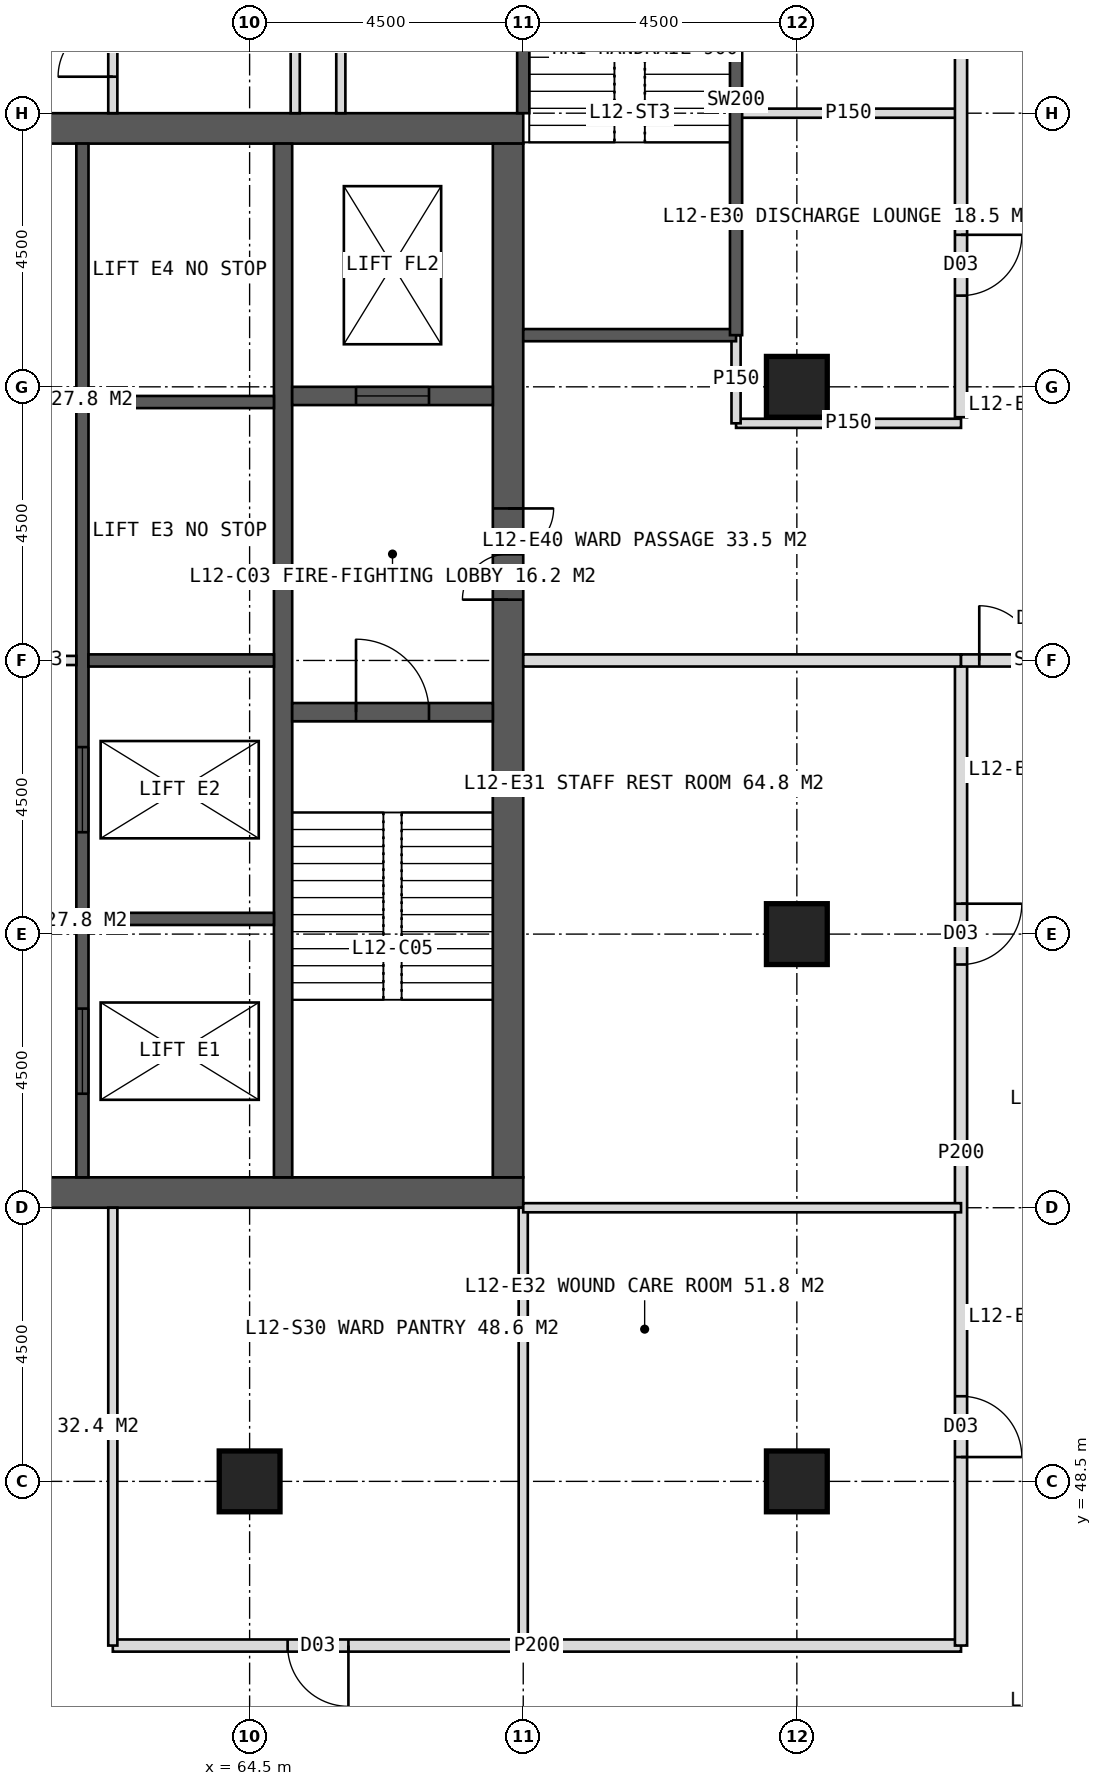
"""IFC4 building model, lengths in metres.
Left out: names, types, materials, properties, quantities, classifications, styles, units other than length and angle.
Written with IfcOpenShell. Run it as: python <this file> out.ifc"""

import sys

from ifc_helpers import new_model, si_unit, direction, frame, frame_2d, origin, origin_2d, place, context, subcontext, project, spatial, rectangle, hollow_rectangle, extrude, element, fill, save


model = new_model("IFC4")
c1 = context("Model", 3, precision=1e-05, world=origin(), true_north=direction((0.0, 1.0)))
c2 = subcontext(c1, "Body", "Model", "MODEL_VIEW")
j1 = project(units=[si_unit("LENGTHUNIT", "METRE"), si_unit("PLANEANGLEUNIT", "RADIAN")], contexts=[c1])
p1 = place(None, origin())
s1 = spatial("IfcSite", under=j1, at=p1, CompositionType="ELEMENT")
p2 = place(p1, origin())
s2 = spatial("IfcBuilding", under=s1, at=p2, CompositionType="ELEMENT")
p3 = place(p2, frame((0.0, 0.0, 55.0)))
s3 = spatial("IfcBuildingStorey", under=s2, at=p3, CompositionType="ELEMENT", Elevation=55.0)
p4 = place(p3, frame((51.0, 70.75, 0.0), z_axis=(0.0, 0.0, 1.0), x_axis=(1.0, 0.0, 0.0)))
e1 = element("IfcWall", 1, at=p4, inside=s3, PredefinedType="SHEAR", context=c2, shape_type="SweptSolid", body=[
    extrude(rectangle(XDim=18.0, YDim=0.5, at=frame_2d((9.0, 0.0))), origin(), (0.0, 0.0, 1.0), 4.0),
])
p5 = place(p4, frame((8.1, 0.0, 0.0)))
e2 = element("IfcOpeningElement", 2, at=p5, cuts=e1, PredefinedType="OPENING", context=c2, shape_type="SweptSolid", body=[
    extrude(rectangle(XDim=1.8, YDim=2.2, at=frame_2d((0.9, 1.1))), frame((0.0, 0.26, 0.0), z_axis=(0.0, -1.0, 0.0), x_axis=(1.0, 0.0, 0.0)), (0.0, 0.0, 1.0), 0.52),
])
p6 = place(p3, frame((51.0, 53.25, 0.0), z_axis=(0.0, 0.0, 1.0), x_axis=(1.0, 0.0, 0.0)))
e3 = element("IfcWall", 3, at=p6, inside=s3, PredefinedType="SHEAR", context=c2, shape_type="SweptSolid", body=[
    extrude(rectangle(XDim=18.0, YDim=0.5, at=frame_2d((9.0, 0.0))), origin(), (0.0, 0.0, 1.0), 4.0),
])
p7 = place(p6, frame((8.1, 0.0, 0.0)))
e4 = element("IfcOpeningElement", 4, at=p7, cuts=e3, PredefinedType="OPENING", context=c2, shape_type="SweptSolid", body=[
    extrude(rectangle(XDim=1.8, YDim=2.2, at=frame_2d((0.9, 1.1))), frame((0.0, 0.26, 0.0), z_axis=(0.0, -1.0, 0.0), x_axis=(1.0, 0.0, 0.0)), (0.0, 0.0, 1.0), 0.52),
])
p8 = place(p3, frame((68.75, 53.5, 0.0), z_axis=(0.0, 0.0, 1.0), x_axis=(0.0, 1.0, 0.0)))
e5 = element("IfcWall", 5, at=p8, inside=s3, PredefinedType="SHEAR", context=c2, shape_type="SweptSolid", body=[
    extrude(rectangle(XDim=17.0, YDim=0.5, at=frame_2d((8.5, 0.0))), origin(), (0.0, 0.0, 1.0), 4.0),
])
p9 = place(p8, frame((9.5, 0.0, 0.0)))
e6 = element("IfcOpeningElement", 6, at=p9, cuts=e5, PredefinedType="OPENING", context=c2, shape_type="SweptSolid", body=[
    extrude(rectangle(XDim=1.5, YDim=2.2, at=frame_2d((0.75, 1.1))), frame((0.0, 0.26, 0.0), z_axis=(0.0, -1.0, 0.0), x_axis=(1.0, 0.0, 0.0)), (0.0, 0.0, 1.0), 0.52),
])
p10 = place(p3, frame((65.05, 53.5, 0.0), z_axis=(0.0, 0.0, 1.0), x_axis=(0.0, 1.0, 0.0)))
e7 = element("IfcWall", 7, at=p10, inside=s3, PredefinedType="SHEAR", context=c2, shape_type="SweptSolid", body=[
    extrude(rectangle(XDim=17.0, YDim=0.3, at=frame_2d((8.5, 0.0))), origin(), (0.0, 0.0, 1.0), 4.0),
])
p11 = place(p3, frame((61.75, 53.5, 0.0), z_axis=(0.0, 0.0, 1.0), x_axis=(0.0, 1.0, 0.0)))
e8 = element("IfcWall", 8, at=p11, inside=s3, PredefinedType="SHEAR", context=c2, shape_type="SweptSolid", body=[
    extrude(rectangle(XDim=17.0, YDim=0.2, at=frame_2d((8.5, 0.0))), origin(), (0.0, 0.0, 1.0), 4.0),
])
p12 = place(p11, frame((1.375, 0.0, 0.0)))
e9 = element("IfcOpeningElement", 9, at=p12, cuts=e8, PredefinedType="OPENING", context=c2, shape_type="SweptSolid", body=[
    extrude(rectangle(XDim=1.4, YDim=2.2, at=frame_2d((0.7, 1.1))), frame((0.0, 0.11, 0.0), z_axis=(0.0, -1.0, 0.0), x_axis=(1.0, 0.0, 0.0)), (0.0, 0.0, 1.0), 0.22),
])
p13 = place(p11, frame((5.675, 0.0, 0.0)))
e10 = element("IfcOpeningElement", 10, at=p13, cuts=e8, PredefinedType="OPENING", context=c2, shape_type="SweptSolid", body=[
    extrude(rectangle(XDim=1.4, YDim=2.2, at=frame_2d((0.7, 1.1))), frame((0.0, 0.11, 0.0), z_axis=(0.0, -1.0, 0.0), x_axis=(1.0, 0.0, 0.0)), (0.0, 0.0, 1.0), 0.22),
])
for number, where, z_axis, x_axis in (
    (11, (61.85, 57.75, 0.0), (0.0, 0.0, 1.0), (1.0, 0.0, 0.0)),
    (12, (61.85, 62.0, 0.0), (0.0, 0.0, 1.0), (1.0, 0.0, 0.0)),
    (13, (61.85, 66.25, 0.0), (0.0, 0.0, 1.0), (1.0, 0.0, 0.0)),
):
    element("IfcWall", number, at=place(p3, frame(where, z_axis=z_axis, x_axis=x_axis)), inside=s3, PredefinedType="SHEAR", context=c2, shape_type="SweptSolid", body=[
        extrude(rectangle(XDim=3.05, YDim=0.2, at=frame_2d((1.525, 0.0))), origin(), (0.0, 0.0, 1.0), 4.0),
    ])
p14 = place(p3, frame((65.2, 61.15, 0.0), z_axis=(0.0, 0.0, 1.0), x_axis=(1.0, 0.0, 0.0)))
e14 = element("IfcWall", 14, at=p14, inside=s3, PredefinedType="SHEAR", context=c2, shape_type="SweptSolid", body=[
    extrude(rectangle(XDim=3.3, YDim=0.3, at=frame_2d((1.65, 0.0))), origin(), (0.0, 0.0, 1.0), 4.0),
])
p15 = place(p14, frame((1.05, 0.0, 0.0)))
e15 = element("IfcOpeningElement", 15, at=p15, cuts=e14, PredefinedType="OPENING", context=c2, shape_type="SweptSolid", body=[
    extrude(rectangle(XDim=1.2, YDim=2.1, at=frame_2d((0.6, 1.05))), frame((0.0, 0.16, 0.0), z_axis=(0.0, -1.0, 0.0), x_axis=(1.0, 0.0, 0.0)), (0.0, 0.0, 1.0), 0.32),
])
p16 = place(p3, frame((65.2, 66.35, 0.0), z_axis=(0.0, 0.0, 1.0), x_axis=(1.0, 0.0, 0.0)))
e16 = element("IfcWall", 16, at=p16, inside=s3, PredefinedType="SHEAR", context=c2, shape_type="SweptSolid", body=[
    extrude(rectangle(XDim=3.3, YDim=0.3, at=frame_2d((1.65, 0.0))), origin(), (0.0, 0.0, 1.0), 4.0),
])
p17 = place(p16, frame((1.05, 0.0, 0.0)))
e17 = element("IfcOpeningElement", 17, at=p17, cuts=e16, PredefinedType="OPENING", context=c2, shape_type="SweptSolid", body=[
    extrude(rectangle(XDim=1.2, YDim=2.2, at=frame_2d((0.6, 1.1))), frame((0.0, 0.16, 0.0), z_axis=(0.0, -1.0, 0.0), x_axis=(1.0, 0.0, 0.0)), (0.0, 0.0, 1.0), 0.32),
])
for number, where, z_axis, x_axis in (
    (18, (73.5, 48.5, 0.0), (0.0, 0.0, 1.0), (1.0, 0.0, 0.0)),
    (19, (64.5, 48.5, 0.0), (0.0, 0.0, 1.0), (1.0, 0.0, 0.0)),
    (20, (73.5, 57.5, 0.0), (0.0, 0.0, 1.0), (1.0, 0.0, 0.0)),
    (21, (73.5, 66.5, 0.0), (0.0, 0.0, 1.0), (1.0, 0.0, 0.0)),
):
    element("IfcColumn", number, at=place(p3, frame(where, z_axis=z_axis, x_axis=x_axis)), inside=s3, PredefinedType="COLUMN", context=c2, shape_type="SweptSolid", body=[
        extrude(hollow_rectangle(XDim=1.0, YDim=1.0, WallThickness=0.1, at=origin_2d()), origin(), (0.0, 0.0, 1.0), 4.0),
    ])
p18 = place(p3, frame((62.25, 71.0, 0.0), z_axis=(0.0, 0.0, 1.0), x_axis=(0.0, 1.0, 0.0)))
e22 = element("IfcWall", 22, at=p18, inside=s3, PredefinedType="PARTITIONING", context=c2, shape_type="SweptSolid", body=[
    extrude(rectangle(XDim=7.2, YDim=0.15, at=frame_2d((3.6, 0.0))), origin(), (0.0, 0.0, 1.0), 3.75),
])
p19 = place(p18, frame((0.6, 0.0, 0.0)))
e23 = element("IfcOpeningElement", 23, at=p19, cuts=e22, PredefinedType="OPENING", context=c2, shape_type="SweptSolid", body=[
    extrude(rectangle(XDim=0.9, YDim=2.1, at=frame_2d((0.45, 1.05))), frame((0.0, 0.085, 0.0), z_axis=(0.0, -1.0, 0.0), x_axis=(1.0, 0.0, 0.0)), (0.0, 0.0, 1.0), 0.17),
])
p20 = place(p3, frame((66.0, 71.0, 0.0), z_axis=(0.0, 0.0, 1.0), x_axis=(0.0, 1.0, 0.0)))
e24 = element("IfcWall", 24, at=p20, inside=s3, PredefinedType="PARTITIONING", context=c2, shape_type="SweptSolid", body=[
    extrude(rectangle(XDim=7.2, YDim=0.15, at=frame_2d((3.6, 0.0))), origin(), (0.0, 0.0, 1.0), 3.75),
])
p21 = place(p3, frame((65.25, 71.0, 0.0), z_axis=(0.0, 0.0, 1.0), x_axis=(0.0, 1.0, 0.0)))
e25 = element("IfcWall", 25, at=p21, inside=s3, PredefinedType="PARTITIONING", context=c2, shape_type="SweptSolid", body=[
    extrude(rectangle(XDim=2.4, YDim=0.15, at=frame_2d((1.2, 0.0))), origin(), (0.0, 0.0, 1.0), 3.75),
])
p22 = place(p3, frame((69.0, 53.0, 0.0), z_axis=(0.0, 0.0, 1.0), x_axis=(0.0, -1.0, 0.0)))
e26 = element("IfcWall", 26, at=p22, inside=s3, PredefinedType="PARTITIONING", context=c2, shape_type="SweptSolid", body=[
    extrude(rectangle(XDim=7.2, YDim=0.15, at=frame_2d((3.6, 0.0))), origin(), (0.0, 0.0, 1.0), 3.75),
])
p23 = place(p3, frame((76.2, 45.8, 0.0), z_axis=(0.0, 0.0, 1.0), x_axis=(-1.0, 0.0, 0.0)))
e27 = element("IfcWall", 27, at=p23, inside=s3, PredefinedType="PARTITIONING", context=c2, shape_type="SweptSolid", body=[
    extrude(rectangle(XDim=13.95, YDim=0.2, at=frame_2d((6.975, 0.0))), origin(), (0.0, 0.0, 1.0), 3.75),
])
p24 = place(p23, frame((10.075, 0.0, 0.0)))
e28 = element("IfcOpeningElement", 28, at=p24, cuts=e27, PredefinedType="OPENING", context=c2, shape_type="SweptSolid", body=[
    extrude(rectangle(XDim=1.0, YDim=2.1, at=frame_2d((0.5, 1.05))), frame((0.0, 0.11, 0.0), z_axis=(0.0, -1.0, 0.0), x_axis=(1.0, 0.0, 0.0)), (0.0, 0.0, 1.0), 0.22),
])
p25 = place(p3, frame((62.25, 53.0, 0.0), z_axis=(0.0, 0.0, 1.0), x_axis=(0.0, -1.0, 0.0)))
e29 = element("IfcWall", 29, at=p25, inside=s3, PredefinedType="PARTITIONING", context=c2, shape_type="SweptSolid", body=[
    extrude(rectangle(XDim=7.2, YDim=0.15, at=frame_2d((3.6, 0.0))), origin(), (0.0, 0.0, 1.0), 3.75),
])
p26 = place(p3, frame((72.5, 71.0, 0.0), z_axis=(0.0, 0.0, 1.0), x_axis=(1.0, 0.0, 0.0)))
e30 = element("IfcWall", 30, at=p26, inside=s3, PredefinedType="PARTITIONING", context=c2, shape_type="SweptSolid", body=[
    extrude(rectangle(XDim=3.7, YDim=0.15, at=frame_2d((1.85, 0.0))), origin(), (0.0, 0.0, 1.0), 3.75),
])
p27 = place(p3, frame((76.2, 78.2, 0.0), z_axis=(0.0, 0.0, 1.0), x_axis=(0.0, -1.0, 0.0)))
e31 = element("IfcWall", 31, at=p27, inside=s3, PredefinedType="PARTITIONING", context=c2, shape_type="SweptSolid", body=[
    extrude(rectangle(XDim=12.2, YDim=0.2, at=frame_2d((6.1, 0.0))), origin(), (0.0, 0.0, 1.0), 3.75),
])
p28 = place(p27, frame((9.2, 0.0, 0.0)))
e32 = element("IfcOpeningElement", 32, at=p28, cuts=e31, PredefinedType="OPENING", context=c2, shape_type="SweptSolid", body=[
    extrude(rectangle(XDim=1.0, YDim=2.1, at=frame_2d((0.5, 1.05))), frame((0.0, 0.11, 0.0), z_axis=(0.0, -1.0, 0.0), x_axis=(1.0, 0.0, 0.0)), (0.0, 0.0, 1.0), 0.22),
])
p29 = place(p3, frame((76.2, 62.0, 0.0), z_axis=(0.0, 0.0, 1.0), x_axis=(0.0, -1.0, 0.0)))
e33 = element("IfcWall", 33, at=p29, inside=s3, PredefinedType="PARTITIONING", context=c2, shape_type="SweptSolid", body=[
    extrude(rectangle(XDim=16.2, YDim=0.2, at=frame_2d((8.1, 0.0))), origin(), (0.0, 0.0, 1.0), 3.75),
])
p30 = place(p29, frame((4.0, 0.0, 0.0)))
e34 = element("IfcOpeningElement", 34, at=p30, cuts=e33, PredefinedType="OPENING", context=c2, shape_type="SweptSolid", body=[
    extrude(rectangle(XDim=1.0, YDim=2.1, at=frame_2d((0.5, 1.05))), frame((0.0, 0.11, 0.0), z_axis=(0.0, -1.0, 0.0), x_axis=(1.0, 0.0, 0.0)), (0.0, 0.0, 1.0), 0.22),
])
p31 = place(p29, frame((12.1, 0.0, 0.0)))
e35 = element("IfcOpeningElement", 35, at=p31, cuts=e33, PredefinedType="OPENING", context=c2, shape_type="SweptSolid", body=[
    extrude(rectangle(XDim=1.0, YDim=2.1, at=frame_2d((0.5, 1.05))), frame((0.0, 0.11, 0.0), z_axis=(0.0, -1.0, 0.0), x_axis=(1.0, 0.0, 0.0)), (0.0, 0.0, 1.0), 0.22),
])
p32 = place(p3, frame((72.5, 65.9, 0.0), z_axis=(0.0, 0.0, 1.0), x_axis=(1.0, 0.0, 0.0)))
e36 = element("IfcWall", 36, at=p32, inside=s3, PredefinedType="PARTITIONING", context=c2, shape_type="SweptSolid", body=[
    extrude(rectangle(XDim=3.7, YDim=0.15, at=frame_2d((1.85, 0.0))), origin(), (0.0, 0.0, 1.0), 3.75),
])
p33 = place(p3, frame((69.0, 62.0, 0.0), z_axis=(0.0, 0.0, 1.0), x_axis=(1.0, 0.0, 0.0)))
e37 = element("IfcWall", 37, at=p33, inside=s3, PredefinedType="SOLIDWALL", context=c2, shape_type="SweptSolid", body=[
    extrude(rectangle(XDim=7.2, YDim=0.2, at=frame_2d((3.6, 0.0))), origin(), (0.0, 0.0, 1.0), 2.75),
])
p34 = place(p3, frame((69.0, 53.0, 0.0), z_axis=(0.0, 0.0, 1.0), x_axis=(1.0, 0.0, 0.0)))
e38 = element("IfcWall", 38, at=p34, inside=s3, PredefinedType="PARTITIONING", context=c2, shape_type="SweptSolid", body=[
    extrude(rectangle(XDim=7.2, YDim=0.15, at=frame_2d((3.6, 0.0))), origin(), (0.0, 0.0, 1.0), 3.75),
])
p35 = place(p3, frame((76.2, 62.0, 0.0), z_axis=(0.0, 0.0, 1.0), x_axis=(1.0, 0.0, 0.0)))
e39 = element("IfcWall", 39, at=p35, inside=s3, PredefinedType="SOLIDWALL", context=c2, shape_type="SweptSolid", body=[
    extrude(rectangle(XDim=2.7, YDim=0.2, at=frame_2d((1.35, 0.0))), origin(), (0.0, 0.0, 1.0), 2.75),
])
p36 = place(p35, frame((0.3, 0.0, 0.0)))
e40 = element("IfcOpeningElement", 40, at=p36, cuts=e39, PredefinedType="OPENING", context=c2, shape_type="SweptSolid", body=[
    extrude(rectangle(XDim=1.8, YDim=2.2, at=frame_2d((0.9, 1.1))), frame((0.0, 0.11, 0.0), z_axis=(0.0, -1.0, 0.0), x_axis=(1.0, 0.0, 0.0)), (0.0, 0.0, 1.0), 0.22),
])
p37 = place(p3, frame((58.35, 62.0, 0.0), z_axis=(0.0, 0.0, 1.0), x_axis=(1.0, 0.0, 0.0)))
e41 = element("IfcWall", 41, at=p37, inside=s3, PredefinedType="PARTITIONING", context=c2, shape_type="SweptSolid", body=[
    extrude(rectangle(XDim=3.3, YDim=0.15, at=frame_2d((1.65, 0.0))), origin(), (0.0, 0.0, 1.0), 3.75),
])
p38 = place(p37, frame((1.15, 0.0, 0.0)))
e42 = element("IfcOpeningElement", 42, at=p38, cuts=e41, PredefinedType="OPENING", context=c2, shape_type="SweptSolid", body=[
    extrude(rectangle(XDim=1.0, YDim=2.1, at=frame_2d((0.5, 1.05))), frame((0.0, 0.085, 0.0), z_axis=(0.0, -1.0, 0.0), x_axis=(1.0, 0.0, 0.0)), (0.0, 0.0, 1.0), 0.17),
])
p39 = place(p3, frame((72.5, 65.9, 0.0), z_axis=(0.0, 0.0, 1.0), x_axis=(0.0, 1.0, 0.0)))
e43 = element("IfcWall", 43, at=p39, inside=s3, PredefinedType="PARTITIONING", context=c2, shape_type="SweptSolid", body=[
    extrude(rectangle(XDim=1.45, YDim=0.15, at=frame_2d((0.725, 0.0))), origin(), (0.0, 0.0, 1.0), 3.75),
])
p40 = place(p3, frame((69.0, 71.0, 0.0), z_axis=(0.0, 0.0, 1.0), x_axis=(0.0, 1.0, 0.0)))
e44 = element("IfcWall", 44, at=p40, inside=s3, PredefinedType="SOLIDWALL", context=c2, shape_type="SweptSolid", body=[
    extrude(rectangle(XDim=4.1, YDim=0.2, at=frame_2d((2.05, 0.0))), origin(), (0.0, 0.0, 1.0), 3.75),
])
p41 = place(p3, frame((69.0, 67.35, 0.0), z_axis=(0.0, 0.0, 1.0), x_axis=(1.0, 0.0, 0.0)))
e45 = element("IfcWall", 45, at=p41, inside=s3, PredefinedType="SOLIDWALL", context=c2, shape_type="SweptSolid", body=[
    extrude(rectangle(XDim=3.5, YDim=0.2, at=frame_2d((1.75, 0.0))), origin(), (0.0, 0.0, 1.0), 3.75),
])
p42 = place(p3, frame((72.5, 67.35, 0.0), z_axis=(0.0, 0.0, 1.0), x_axis=(0.0, 1.0, 0.0)))
e46 = element("IfcWall", 46, at=p42, inside=s3, PredefinedType="SOLIDWALL", context=c2, shape_type="SweptSolid", body=[
    extrude(rectangle(XDim=7.75, YDim=0.2, at=frame_2d((3.875, 0.0))), origin(), (0.0, 0.0, 1.0), 3.75),
])
p43 = place(p19, origin())
e47 = element("IfcDoor", 47, at=p43, inside=s3, OperationType="SINGLE_SWING_LEFT", PredefinedType="DOOR", context=c2, shape_type="SweptSolid", body=[
    extrude(rectangle(XDim=0.9, YDim=2.1, at=frame_2d((0.45, 1.05))), frame((0.0, 0.025, 0.0), z_axis=(0.0, -1.0, 0.0), x_axis=(1.0, 0.0, 0.0)), (0.0, 0.0, 1.0), 0.05),
])
fill(e23, e47)
p44 = place(p24, origin())
e48 = element("IfcDoor", 48, at=p44, inside=s3, OperationType="SINGLE_SWING_LEFT", PredefinedType="DOOR", context=c2, shape_type="SweptSolid", body=[
    extrude(rectangle(XDim=1.0, YDim=2.1, at=frame_2d((0.5, 1.05))), frame((0.0, 0.025, 0.0), z_axis=(0.0, -1.0, 0.0), x_axis=(1.0, 0.0, 0.0)), (0.0, 0.0, 1.0), 0.05),
])
fill(e28, e48)
p45 = place(p28, origin())
e49 = element("IfcDoor", 49, at=p45, inside=s3, OperationType="SINGLE_SWING_LEFT", PredefinedType="DOOR", context=c2, shape_type="SweptSolid", body=[
    extrude(rectangle(XDim=1.0, YDim=2.1, at=frame_2d((0.5, 1.05))), frame((0.0, 0.025, 0.0), z_axis=(0.0, -1.0, 0.0), x_axis=(1.0, 0.0, 0.0)), (0.0, 0.0, 1.0), 0.05),
])
fill(e32, e49)
p46 = place(p30, origin())
e50 = element("IfcDoor", 50, at=p46, inside=s3, OperationType="SINGLE_SWING_LEFT", PredefinedType="DOOR", context=c2, shape_type="SweptSolid", body=[
    extrude(rectangle(XDim=1.0, YDim=2.1, at=frame_2d((0.5, 1.05))), frame((0.0, 0.025, 0.0), z_axis=(0.0, -1.0, 0.0), x_axis=(1.0, 0.0, 0.0)), (0.0, 0.0, 1.0), 0.05),
])
fill(e34, e50)
p47 = place(p31, origin())
e51 = element("IfcDoor", 51, at=p47, inside=s3, OperationType="SINGLE_SWING_RIGHT", PredefinedType="DOOR", context=c2, shape_type="SweptSolid", body=[
    extrude(rectangle(XDim=1.0, YDim=2.1, at=frame_2d((0.5, 1.05))), frame((0.0, 0.025, 0.0), z_axis=(0.0, -1.0, 0.0), x_axis=(1.0, 0.0, 0.0)), (0.0, 0.0, 1.0), 0.05),
])
fill(e35, e51)
p48 = place(p36, origin())
e52 = element("IfcDoor", 52, at=p48, inside=s3, OperationType="DOUBLE_DOOR_DOUBLE_SWING", PredefinedType="DOOR", context=c2, shape_type="SweptSolid", body=[
    extrude(rectangle(XDim=1.8, YDim=2.2, at=frame_2d((0.9, 1.1))), frame((0.0, 0.025, 0.0), z_axis=(0.0, -1.0, 0.0), x_axis=(1.0, 0.0, 0.0)), (0.0, 0.0, 1.0), 0.05),
])
fill(e40, e52)
p49 = place(p9, origin())
e53 = element("IfcDoor", 53, at=p49, inside=s3, OperationType="DOUBLE_DOOR_SINGLE_SWING", PredefinedType="DOOR", context=c2, shape_type="SweptSolid", body=[
    extrude(rectangle(XDim=1.5, YDim=2.2, at=frame_2d((0.75, 1.1))), frame((0.0, 0.025, 0.0), z_axis=(0.0, -1.0, 0.0), x_axis=(1.0, 0.0, 0.0)), (0.0, 0.0, 1.0), 0.05),
])
fill(e6, e53)
p50 = place(p15, origin())
e54 = element("IfcDoor", 54, at=p50, inside=s3, OperationType="SINGLE_SWING_LEFT", PredefinedType="DOOR", context=c2, shape_type="SweptSolid", body=[
    extrude(rectangle(XDim=1.2, YDim=2.1, at=frame_2d((0.6, 1.05))), frame((0.0, 0.025, 0.0), z_axis=(0.0, -1.0, 0.0), x_axis=(1.0, 0.0, 0.0)), (0.0, 0.0, 1.0), 0.05),
])
fill(e15, e54)
p51 = place(p17, origin())
e55 = element("IfcDoor", 55, at=p51, inside=s3, OperationType="SLIDING_TO_LEFT", PredefinedType="DOOR", context=c2, shape_type="SweptSolid", body=[
    extrude(rectangle(XDim=1.2, YDim=2.2, at=frame_2d((0.6, 1.1))), frame((0.0, 0.025, 0.0), z_axis=(0.0, -1.0, 0.0), x_axis=(1.0, 0.0, 0.0)), (0.0, 0.0, 1.0), 0.05),
])
fill(e17, e55)
p52 = place(p12, origin())
e56 = element("IfcDoor", 56, at=p52, inside=s3, OperationType="SLIDING_TO_LEFT", PredefinedType="DOOR", context=c2, shape_type="SweptSolid", body=[
    extrude(rectangle(XDim=1.4, YDim=2.2, at=frame_2d((0.7, 1.1))), frame((0.0, 0.025, 0.0), z_axis=(0.0, -1.0, 0.0), x_axis=(1.0, 0.0, 0.0)), (0.0, 0.0, 1.0), 0.05),
])
fill(e9, e56)
p53 = place(p13, origin())
e57 = element("IfcDoor", 57, at=p53, inside=s3, OperationType="SLIDING_TO_LEFT", PredefinedType="DOOR", context=c2, shape_type="SweptSolid", body=[
    extrude(rectangle(XDim=1.4, YDim=2.2, at=frame_2d((0.7, 1.1))), frame((0.0, 0.025, 0.0), z_axis=(0.0, -1.0, 0.0), x_axis=(1.0, 0.0, 0.0)), (0.0, 0.0, 1.0), 0.05),
])
fill(e10, e57)
save(model, sys.argv[1])
